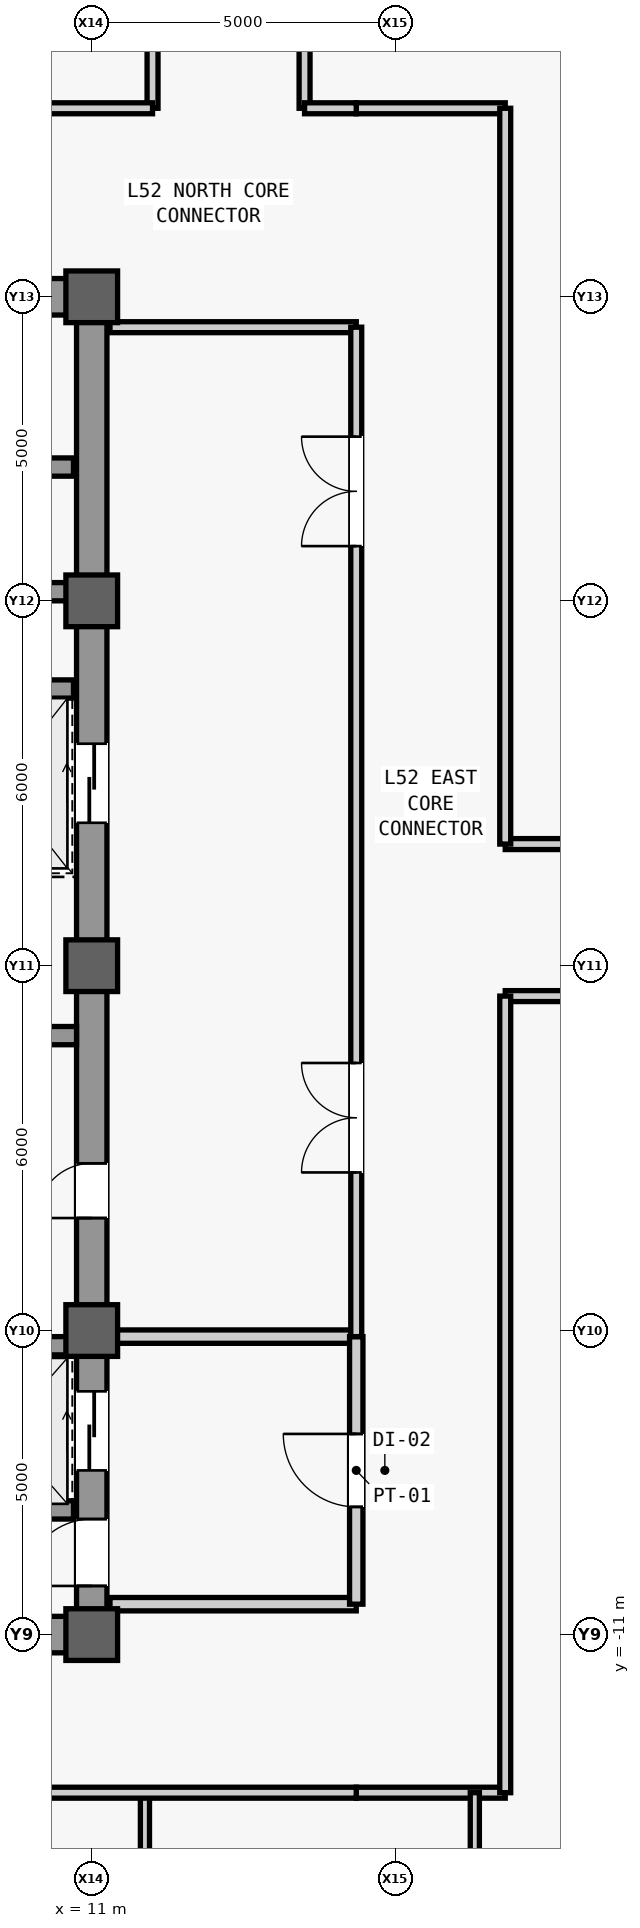
"""IFC4 building model, lengths in metres.
Left out: names, types, materials, properties, quantities, classifications, styles, units other than length and angle.
Written with IfcOpenShell. Run it as: python <this file> out.ifc"""

import sys

from ifc_helpers import new_model, si_unit, direction, frame, frame_2d, origin, origin_2d, place, context, subcontext, project, spatial, rectangle, extrude, source, transform, mapped, element, fill, save


model = new_model("IFC4")
c1 = context("Model", 3, precision=1e-05, world=origin(), true_north=direction((0.0, 1.0)))
c2 = subcontext(c1, "Body", "Model", "MODEL_VIEW")
j1 = project(units=[si_unit("LENGTHUNIT", "METRE"), si_unit("PLANEANGLEUNIT", "RADIAN")], contexts=[c1])
p1 = place(None, origin())
s1 = spatial("IfcSite", under=j1, at=p1, CompositionType="ELEMENT")
p2 = place(p1, origin())
s2 = spatial("IfcBuilding", under=s1, at=p2, CompositionType="ELEMENT")
p3 = place(p2, frame((0.0, 0.0, 223.1)))
s3 = spatial("IfcBuildingStorey", under=s2, at=p3, CompositionType="ELEMENT", Elevation=223.1)
m1 = source(origin(), c2, "Body", "SweptSolid", [
    extrude(rectangle(XDim=22.0, YDim=0.5, at=frame_2d((11.0, 0.0))), origin(), (0.0, 0.0, 1.0), 3.78),
])
p4 = place(p3, frame((11.0, -11.0, 0.0), z_axis=(0.0, 0.0, 1.0), x_axis=(0.0, 1.0, 0.0)))
e1 = element("IfcWall", 1, at=p4, inside=s3, PredefinedType="SHEAR", context=c2, shape_type="MappedRepresentation", body=[
    mapped(m1, transform((0.0, 0.0, 0.0), scale=1.0)),
])
m2 = source(origin(), c2, "Body", "SweptSolid", [
    extrude(rectangle(XDim=1.1, YDim=2.2, at=frame_2d((0.55, 1.1))), frame((0.0, 0.26, 0.0), z_axis=(0.0, -1.0, 0.0), x_axis=(1.0, 0.0, 0.0)), (0.0, 0.0, 1.0), 0.52),
])
p5 = place(p4, frame((0.8, 0.0, 0.0)))
e2 = element("IfcOpeningElement", 2, at=p5, cuts=e1, PredefinedType="OPENING", context=c2, shape_type="MappedRepresentation", body=[
    mapped(m2, transform((0.0, 0.0, 0.0), scale=1.0)),
])
m3 = source(origin(), c2, "Body", "SweptSolid", [
    extrude(rectangle(XDim=0.9, YDim=2.15, at=frame_2d((0.45, 1.075))), frame((0.0, 0.26, 0.0), z_axis=(0.0, -1.0, 0.0), x_axis=(1.0, 0.0, 0.0)), (0.0, 0.0, 1.0), 0.52),
])
p6 = place(p4, frame((6.85, 0.0, 0.0)))
e3 = element("IfcOpeningElement", 3, at=p6, cuts=e1, PredefinedType="OPENING", context=c2, shape_type="MappedRepresentation", body=[
    mapped(m3, transform((0.0, 0.0, 0.0), scale=1.0)),
])
m4 = source(origin(), c2, "Body", "SweptSolid", [
    extrude(rectangle(XDim=1.3, YDim=2.3, at=frame_2d((0.65, 1.15))), frame((0.0, 0.26, 0.0), z_axis=(0.0, -1.0, 0.0), x_axis=(1.0, 0.0, 0.0)), (0.0, 0.0, 1.0), 0.52),
])
p7 = place(p4, frame((2.7, 0.0, 0.0)))
e4 = element("IfcOpeningElement", 4, at=p7, cuts=e1, PredefinedType="OPENING", context=c2, shape_type="MappedRepresentation", body=[
    mapped(m4, transform((0.0, 0.0, 0.0), scale=1.0)),
])
p8 = place(p4, frame((13.35, 0.0, 0.0)))
e5 = element("IfcOpeningElement", 5, at=p8, cuts=e1, PredefinedType="OPENING", context=c2, shape_type="MappedRepresentation", body=[
    mapped(m4, transform((0.0, 0.0, 0.0), scale=1.0)),
])
m5 = source(origin(), c2, "Body", "SweptSolid", [
    extrude(rectangle(XDim=5.9, YDim=0.6, at=frame_2d((2.95, 0.0))), origin(), (0.0, 0.0, 1.0), 3.78),
])
p9 = place(p3, frame((4.85, -11.0, 0.0), z_axis=(0.0, 0.0, 1.0), x_axis=(1.0, 0.0, 0.0)))
e6 = element("IfcWall", 6, at=p9, inside=s3, PredefinedType="SHEAR", context=c2, shape_type="MappedRepresentation", body=[
    mapped(m5, transform((0.0, 0.0, 0.0), scale=1.0)),
])
p10 = place(p3, frame((4.85, 11.0, 0.0), z_axis=(0.0, 0.0, 1.0), x_axis=(1.0, 0.0, 0.0)))
e7 = element("IfcWall", 7, at=p10, inside=s3, PredefinedType="SHEAR", context=c2, shape_type="MappedRepresentation", body=[
    mapped(m5, transform((0.0, 0.0, 0.0), scale=1.0)),
])
m6 = source(origin(), c2, "Body", "SweptSolid", [
    extrude(rectangle(XDim=1.05, YDim=2.2, at=frame_2d((0.525, 1.1))), frame((0.0, 0.31, 0.0), z_axis=(0.0, -1.0, 0.0), x_axis=(1.0, 0.0, 0.0)), (0.0, 0.0, 1.0), 0.62),
])
p11 = place(p10, frame((1.375, 0.0, 0.0)))
e8 = element("IfcOpeningElement", 8, at=p11, cuts=e7, PredefinedType="OPENING", context=c2, shape_type="MappedRepresentation", body=[
    mapped(m6, transform((0.0, 0.0, 0.0), scale=1.0)),
])
m7 = source(origin(), c2, "Body", "SweptSolid", [
    extrude(rectangle(XDim=5.65, YDim=0.3, at=frame_2d((2.825, 0.0))), origin(), (0.0, 0.0, 1.0), 3.78),
])
p12 = place(p3, frame((5.1, -1.15, 0.0), z_axis=(0.0, 0.0, 1.0), x_axis=(1.0, 0.0, 0.0)))
e9 = element("IfcWall", 9, at=p12, inside=s3, PredefinedType="SHEAR", context=c2, shape_type="MappedRepresentation", body=[
    mapped(m7, transform((0.0, 0.0, 0.0), scale=1.0)),
])
m8 = source(origin(), c2, "Body", "SweptSolid", [
    extrude(rectangle(XDim=0.85, YDim=0.85, at=origin_2d()), origin(), (0.0, 0.0, 1.0), 4.0),
])
for number, where, z_axis, x_axis in (
    (10, (11.0, -11.0, 0.0), (0.0, 0.0, 1.0), (1.0, 0.0, 0.0)),
    (11, (11.0, -6.0, 0.0), (0.0, 0.0, 1.0), (1.0, 0.0, 0.0)),
    (12, (11.0, 0.0, 0.0), (0.0, 0.0, 1.0), (1.0, 0.0, 0.0)),
    (13, (11.0, 6.0, 0.0), (0.0, 0.0, 1.0), (1.0, 0.0, 0.0)),
    (14, (11.0, 11.0, 0.0), (0.0, 0.0, 1.0), (1.0, 0.0, 0.0)),
):
    element("IfcColumn", number, at=place(p3, frame(where, z_axis=z_axis, x_axis=x_axis)), inside=s3, PredefinedType="COLUMN", context=c2, shape_type="MappedRepresentation", body=[
        mapped(m8, transform((0.0, 0.0, 0.0), scale=1.0)),
    ])
m9 = source(origin(), c2, "Body", "SweptSolid", [
    extrude(rectangle(XDim=2.2, YDim=0.3, at=frame_2d((1.1, 0.0))), origin(), (0.0, 0.0, 1.0), 3.78),
])
for number, where, z_axis, x_axis in (
    (15, (8.5, -8.95, 0.0), (0.0, 0.0, 1.0), (1.0, 0.0, 0.0)),
    (16, (8.5, -6.25, 0.0), (0.0, 0.0, 1.0), (1.0, 0.0, 0.0)),
):
    element("IfcWall", number, at=place(p3, frame(where, z_axis=z_axis, x_axis=x_axis)), inside=s3, PredefinedType="SHEAR", context=c2, shape_type="MappedRepresentation", body=[
        mapped(m9, transform((0.0, 0.0, 0.0), scale=1.0)),
    ])
m10 = source(origin(), c2, "Body", "SweptSolid", [
    extrude(rectangle(XDim=2.3, YDim=0.3, at=frame_2d((1.15, 0.0))), origin(), (0.0, 0.0, 1.0), 3.78),
])
for number, where, z_axis, x_axis in (
    (17, (8.4, 4.55, 0.0), (0.0, 0.0, 1.0), (1.0, 0.0, 0.0)),
    (18, (8.4, 6.15, 0.0), (0.0, 0.0, 1.0), (1.0, 0.0, 0.0)),
    (19, (8.4, 8.2, 0.0), (0.0, 0.0, 1.0), (1.0, 0.0, 0.0)),
):
    element("IfcWall", number, at=place(p3, frame(where, z_axis=z_axis, x_axis=x_axis)), inside=s3, PredefinedType="SHEAR", context=c2, shape_type="MappedRepresentation", body=[
        mapped(m10, transform((0.0, 0.0, 0.0), scale=1.0)),
    ])
m11 = source(origin(), c2, "Body", "SweptSolid", [
    extrude(rectangle(XDim=4.05, YDim=0.22, at=frame_2d((2.025, 0.0))), origin(), (0.0, 0.0, 1.0), 3.78),
])
p13 = place(p3, frame((11.3, -10.5, 0.0), z_axis=(0.0, 0.0, 1.0), x_axis=(1.0, 0.0, 0.0)))
e20 = element("IfcWall", 20, at=p13, inside=s3, PredefinedType="PARTITIONING", context=c2, shape_type="MappedRepresentation", body=[
    mapped(m11, transform((0.0, 0.0, 0.0), scale=1.0)),
])
m12 = source(origin(), c2, "Body", "SweptSolid", [
    extrude(rectangle(XDim=4.05, YDim=0.22, at=frame_2d((2.025, 0.0))), origin(), (0.0, 0.0, 1.0), 3.085),
])
p14 = place(p3, frame((11.3, -6.1, 0.0), z_axis=(0.0, 0.0, 1.0), x_axis=(1.0, 0.0, 0.0)))
e21 = element("IfcWall", 21, at=p14, inside=s3, PredefinedType="PARTITIONING", context=c2, shape_type="MappedRepresentation", body=[
    mapped(m12, transform((0.0, 0.0, 0.0), scale=1.0)),
])
m13 = source(origin(), c2, "Body", "SweptSolid", [
    extrude(rectangle(XDim=4.4, YDim=0.22, at=frame_2d((2.2, 0.0))), origin(), (0.0, 0.0, 1.0), 3.78),
])
p15 = place(p3, frame((15.35, -10.5, 0.0), z_axis=(0.0, 0.0, 1.0), x_axis=(0.0, 1.0, 0.0)))
e22 = element("IfcWall", 22, at=p15, inside=s3, PredefinedType="PARTITIONING", context=c2, shape_type="MappedRepresentation", body=[
    mapped(m13, transform((0.0, 0.0, 0.0), scale=1.0)),
])
m14 = source(origin(), c2, "Body", "SweptSolid", [
    extrude(rectangle(XDim=1.2, YDim=2.2, at=frame_2d((0.6, 1.1))), frame((0.0, 0.12, 0.0), z_axis=(0.0, -1.0, 0.0), x_axis=(1.0, 0.0, 0.0)), (0.0, 0.0, 1.0), 0.24),
])
p16 = place(p15, frame((1.6, 0.0, 0.0)))
e23 = element("IfcOpeningElement", 23, at=p16, cuts=e22, PredefinedType="OPENING", context=c2, shape_type="MappedRepresentation", body=[
    mapped(m14, transform((0.0, 0.0, 0.0), scale=1.0)),
])
m15 = source(origin(), c2, "Body", "SweptSolid", [
    extrude(rectangle(XDim=4.05, YDim=0.18, at=frame_2d((2.025, 0.0))), origin(), (0.0, 0.0, 1.0), 3.78),
])
p17 = place(p3, frame((11.3, 10.5, 0.0), z_axis=(0.0, 0.0, 1.0), x_axis=(1.0, 0.0, 0.0)))
e24 = element("IfcWall", 24, at=p17, inside=s3, PredefinedType="PARTITIONING", context=c2, shape_type="MappedRepresentation", body=[
    mapped(m15, transform((0.0, 0.0, 0.0), scale=1.0)),
])
m16 = source(origin(), c2, "Body", "SweptSolid", [
    extrude(rectangle(XDim=16.6, YDim=0.18, at=frame_2d((8.3, 0.0))), origin(), (0.0, 0.0, 1.0), 3.78),
])
p18 = place(p3, frame((15.35, -6.1, 0.0), z_axis=(0.0, 0.0, 1.0), x_axis=(0.0, 1.0, 0.0)))
e25 = element("IfcWall", 25, at=p18, inside=s3, PredefinedType="PARTITIONING", context=c2, shape_type="MappedRepresentation", body=[
    mapped(m16, transform((0.0, 0.0, 0.0), scale=1.0)),
])
m17 = source(origin(), c2, "Body", "SweptSolid", [
    extrude(rectangle(XDim=1.8, YDim=2.25, at=frame_2d((0.9, 1.125))), frame((0.0, 0.1, 0.0), z_axis=(0.0, -1.0, 0.0), x_axis=(1.0, 0.0, 0.0)), (0.0, 0.0, 1.0), 0.2),
])
p19 = place(p18, frame((2.7, 0.0, 0.0)))
e26 = element("IfcOpeningElement", 26, at=p19, cuts=e25, PredefinedType="OPENING", context=c2, shape_type="MappedRepresentation", body=[
    mapped(m17, transform((0.0, 0.0, 0.0), scale=1.0)),
])
p20 = place(p18, frame((13.0, 0.0, 0.0)))
e27 = element("IfcOpeningElement", 27, at=p20, cuts=e25, PredefinedType="OPENING", context=c2, shape_type="MappedRepresentation", body=[
    mapped(m17, transform((0.0, 0.0, 0.0), scale=1.0)),
])
m18 = source(origin(), c2, "Body", "SweptSolid", [
    extrude(rectangle(XDim=2.45, YDim=0.18, at=frame_2d((1.225, 0.0))), origin(), (0.0, 0.0, 1.0), 3.78),
])
for number, where, z_axis, x_axis in (
    (28, (15.35, -13.6, 0.0), (0.0, 0.0, 1.0), (1.0, 0.0, 0.0)),
    (29, (15.35, 14.1, 0.0), (0.0, 0.0, 1.0), (1.0, 0.0, 0.0)),
):
    element("IfcWall", number, at=place(p3, frame(where, z_axis=z_axis, x_axis=x_axis)), inside=s3, PredefinedType="PARTITIONING", context=c2, shape_type="MappedRepresentation", body=[
        mapped(m18, transform((0.0, 0.0, 0.0), scale=1.0)),
    ])
m19 = source(origin(), c2, "Body", "SweptSolid", [
    extrude(rectangle(XDim=16.4, YDim=0.15, at=frame_2d((8.2, 0.0))), origin(), (0.0, 0.0, 1.0), 3.78),
])
p21 = place(p3, frame((11.875, -30.0, 0.0), z_axis=(0.0, 0.0, 1.0), x_axis=(0.0, 1.0, 0.0)))
e30 = element("IfcWall", 30, at=p21, inside=s3, PredefinedType="PARTITIONING", context=c2, shape_type="MappedRepresentation", body=[
    mapped(m19, transform((0.0, 0.0, 0.0), scale=1.0)),
])
m20 = source(origin(), c2, "Body", "SweptSolid", [
    extrude(rectangle(XDim=0.95, YDim=2.15, at=frame_2d((0.475, 1.075))), frame((0.0, 0.085, 0.0), z_axis=(0.0, -1.0, 0.0), x_axis=(1.0, 0.0, 0.0)), (0.0, 0.0, 1.0), 0.17),
])
p22 = place(p21, frame((11.825, 0.0, 0.0)))
e31 = element("IfcOpeningElement", 31, at=p22, cuts=e30, PredefinedType="OPENING", context=c2, shape_type="MappedRepresentation", body=[
    mapped(m20, transform((0.0, 0.0, 0.0), scale=1.0)),
])
p23 = place(p3, frame((17.3, -30.0, 0.0), z_axis=(0.0, 0.0, 1.0), x_axis=(0.0, 1.0, 0.0)))
e32 = element("IfcWall", 32, at=p23, inside=s3, PredefinedType="PARTITIONING", context=c2, shape_type="MappedRepresentation", body=[
    mapped(m19, transform((0.0, 0.0, 0.0), scale=1.0)),
])
p24 = place(p23, frame((11.825, 0.0, 0.0)))
e33 = element("IfcOpeningElement", 33, at=p24, cuts=e32, PredefinedType="OPENING", context=c2, shape_type="MappedRepresentation", body=[
    mapped(m20, transform((0.0, 0.0, 0.0), scale=1.0)),
])
m21 = source(origin(), c2, "Body", "SweptSolid", [
    extrude(rectangle(XDim=7.85, YDim=0.18, at=frame_2d((3.925, 0.0))), origin(), (0.0, 0.0, 1.0), 3.78),
])
p25 = place(p3, frame((7.5, -13.6, 0.0), z_axis=(0.0, 0.0, 1.0), x_axis=(1.0, 0.0, 0.0)))
e34 = element("IfcWall", 34, at=p25, inside=s3, PredefinedType="PARTITIONING", context=c2, shape_type="MappedRepresentation", body=[
    mapped(m21, transform((0.0, 0.0, 0.0), scale=1.0)),
])
m22 = source(origin(), c2, "Body", "SweptSolid", [
    extrude(rectangle(XDim=15.9, YDim=0.18, at=frame_2d((7.95, 0.0))), origin(), (0.0, 0.0, 1.0), 3.78),
])
p26 = place(p3, frame((12.0, 14.1, 0.0), z_axis=(0.0, 0.0, 1.0), x_axis=(0.0, 1.0, 0.0)))
e35 = element("IfcWall", 35, at=p26, inside=s3, PredefinedType="PARTITIONING", context=c2, shape_type="MappedRepresentation", body=[
    mapped(m22, transform((0.0, 0.0, 0.0), scale=1.0)),
])
m23 = source(origin(), c2, "Body", "SweptSolid", [
    extrude(rectangle(XDim=1.05, YDim=2.2, at=frame_2d((0.525, 1.1))), frame((0.0, 0.1, 0.0), z_axis=(0.0, -1.0, 0.0), x_axis=(1.0, 0.0, 0.0)), (0.0, 0.0, 1.0), 0.2),
])
p27 = place(p26, frame((11.4, 0.0, 0.0)))
e36 = element("IfcOpeningElement", 36, at=p27, cuts=e35, PredefinedType="OPENING", context=c2, shape_type="MappedRepresentation", body=[
    mapped(m23, transform((0.0, 0.0, 0.0), scale=1.0)),
])
m24 = source(origin(), c2, "Body", "SweptSolid", [
    extrude(rectangle(XDim=27.35, YDim=0.18, at=frame_2d((13.675, 0.0))), origin(), (0.0, 0.0, 1.0), 3.78),
])
p28 = place(p3, frame((-15.35, 14.1, 0.0), z_axis=(0.0, 0.0, 1.0), x_axis=(1.0, 0.0, 0.0)))
e37 = element("IfcWall", 37, at=p28, inside=s3, PredefinedType="PARTITIONING", context=c2, shape_type="MappedRepresentation", body=[
    mapped(m24, transform((0.0, 0.0, 0.0), scale=1.0)),
])
p29 = place(p3, frame((14.5, 14.1, 0.0), z_axis=(0.0, 0.0, 1.0), x_axis=(0.0, 1.0, 0.0)))
e38 = element("IfcWall", 38, at=p29, inside=s3, PredefinedType="PARTITIONING", context=c2, shape_type="MappedRepresentation", body=[
    mapped(m22, transform((0.0, 0.0, 0.0), scale=1.0)),
])
p30 = place(p29, frame((11.4, 0.0, 0.0)))
e39 = element("IfcOpeningElement", 39, at=p30, cuts=e38, PredefinedType="OPENING", context=c2, shape_type="MappedRepresentation", body=[
    mapped(m23, transform((0.0, 0.0, 0.0), scale=1.0)),
])
m25 = source(origin(), c2, "Body", "SweptSolid", [
    extrude(rectangle(XDim=0.85, YDim=0.18, at=frame_2d((0.425, 0.0))), origin(), (0.0, 0.0, 1.0), 3.78),
])
p31 = place(p3, frame((14.5, 14.1, 0.0), z_axis=(0.0, 0.0, 1.0), x_axis=(1.0, 0.0, 0.0)))
e40 = element("IfcWall", 40, at=p31, inside=s3, PredefinedType="PARTITIONING", context=c2, shape_type="MappedRepresentation", body=[
    mapped(m25, transform((0.0, 0.0, 0.0), scale=1.0)),
])
m26 = source(origin(), c2, "Body", "SweptSolid", [
    extrude(rectangle(XDim=12.2, YDim=0.18, at=frame_2d((6.1, 0.0))), origin(), (0.0, 0.0, 1.0), 3.78),
])
p32 = place(p3, frame((17.8, -0.5, 0.0), z_axis=(0.0, 0.0, 1.0), x_axis=(1.0, 0.0, 0.0)))
e41 = element("IfcWall", 41, at=p32, inside=s3, PredefinedType="PARTITIONING", context=c2, shape_type="MappedRepresentation", body=[
    mapped(m26, transform((0.0, 0.0, 0.0), scale=1.0)),
])
m27 = source(origin(), c2, "Body", "SweptSolid", [
    extrude(rectangle(XDim=0.95, YDim=2.15, at=frame_2d((0.475, 1.075))), frame((0.0, 0.1, 0.0), z_axis=(0.0, -1.0, 0.0), x_axis=(1.0, 0.0, 0.0)), (0.0, 0.0, 1.0), 0.2),
])
p33 = place(p32, frame((2.758, 0.0, 0.0)))
e42 = element("IfcOpeningElement", 42, at=p33, cuts=e41, PredefinedType="OPENING", context=c2, shape_type="MappedRepresentation", body=[
    mapped(m27, transform((0.0, 0.0, 0.0), scale=1.0)),
])
p34 = place(p32, frame((8.858, 0.0, 0.0)))
e43 = element("IfcOpeningElement", 43, at=p34, cuts=e41, PredefinedType="OPENING", context=c2, shape_type="MappedRepresentation", body=[
    mapped(m27, transform((0.0, 0.0, 0.0), scale=1.0)),
])
m28 = source(origin(), c2, "Body", "SweptSolid", [
    extrude(rectangle(XDim=13.1, YDim=0.18, at=frame_2d((6.55, 0.0))), origin(), (0.0, 0.0, 1.0), 3.78),
])
p35 = place(p3, frame((17.8, -13.6, 0.0), z_axis=(0.0, 0.0, 1.0), x_axis=(0.0, 1.0, 0.0)))
e44 = element("IfcWall", 44, at=p35, inside=s3, PredefinedType="PARTITIONING", context=c2, shape_type="MappedRepresentation", body=[
    mapped(m28, transform((0.0, 0.0, 0.0), scale=1.0)),
])
p36 = place(p3, frame((17.8, 2.0, 0.0), z_axis=(0.0, 0.0, 1.0), x_axis=(1.0, 0.0, 0.0)))
e45 = element("IfcWall", 45, at=p36, inside=s3, PredefinedType="PARTITIONING", context=c2, shape_type="MappedRepresentation", body=[
    mapped(m26, transform((0.0, 0.0, 0.0), scale=1.0)),
])
p37 = place(p36, frame((2.758, 0.0, 0.0)))
e46 = element("IfcOpeningElement", 46, at=p37, cuts=e45, PredefinedType="OPENING", context=c2, shape_type="MappedRepresentation", body=[
    mapped(m27, transform((0.0, 0.0, 0.0), scale=1.0)),
])
p38 = place(p36, frame((8.858, 0.0, 0.0)))
e47 = element("IfcOpeningElement", 47, at=p38, cuts=e45, PredefinedType="OPENING", context=c2, shape_type="MappedRepresentation", body=[
    mapped(m27, transform((0.0, 0.0, 0.0), scale=1.0)),
])
m29 = source(origin(), c2, "Body", "SweptSolid", [
    extrude(rectangle(XDim=12.1, YDim=0.18, at=frame_2d((6.05, 0.0))), origin(), (0.0, 0.0, 1.0), 3.78),
])
p39 = place(p3, frame((17.8, 2.0, 0.0), z_axis=(0.0, 0.0, 1.0), x_axis=(0.0, 1.0, 0.0)))
e48 = element("IfcWall", 48, at=p39, inside=s3, PredefinedType="PARTITIONING", context=c2, shape_type="MappedRepresentation", body=[
    mapped(m29, transform((0.0, 0.0, 0.0), scale=1.0)),
])
m30 = source(origin(), c2, "Body", "SweptSolid", [
    extrude(rectangle(XDim=1.1, YDim=2.2, at=frame_2d((0.55, 1.1))), frame((0.0, 0.025, 0.0), z_axis=(0.0, -1.0, 0.0), x_axis=(1.0, 0.0, 0.0)), (0.0, 0.0, 1.0), 0.05),
])
p40 = place(p5, origin())
e49 = element("IfcDoor", 49, at=p40, inside=s3, OperationType="SINGLE_SWING_LEFT", PredefinedType="DOOR", context=c2, shape_type="MappedRepresentation", body=[
    mapped(m30, transform((0.0, 0.0, 0.0), scale=1.0)),
])
fill(e2, e49)
m31 = source(origin(), c2, "Body", "SweptSolid", [
    extrude(rectangle(XDim=0.9, YDim=2.15, at=frame_2d((0.45, 1.075))), frame((0.0, 0.025, 0.0), z_axis=(0.0, -1.0, 0.0), x_axis=(1.0, 0.0, 0.0)), (0.0, 0.0, 1.0), 0.05),
])
p41 = place(p6, origin())
e50 = element("IfcDoor", 50, at=p41, inside=s3, OperationType="SINGLE_SWING_LEFT", PredefinedType="DOOR", context=c2, shape_type="MappedRepresentation", body=[
    mapped(m31, transform((0.0, 0.0, 0.0), scale=1.0)),
])
fill(e3, e50)
m32 = source(origin(), c2, "Body", "SweptSolid", [
    extrude(rectangle(XDim=1.2, YDim=2.2, at=frame_2d((0.6, 1.1))), frame((0.0, 0.025, 0.0), z_axis=(0.0, -1.0, 0.0), x_axis=(1.0, 0.0, 0.0)), (0.0, 0.0, 1.0), 0.05),
])
p42 = place(p16, origin())
e51 = element("IfcDoor", 51, at=p42, inside=s3, OperationType="SINGLE_SWING_RIGHT", PredefinedType="DOOR", context=c2, shape_type="MappedRepresentation", body=[
    mapped(m32, transform((0.0, 0.0, 0.0), scale=1.0)),
])
fill(e23, e51)
m33 = source(origin(), c2, "Body", "SweptSolid", [
    extrude(rectangle(XDim=1.8, YDim=2.25, at=frame_2d((0.9, 1.125))), frame((0.0, 0.025, 0.0), z_axis=(0.0, -1.0, 0.0), x_axis=(1.0, 0.0, 0.0)), (0.0, 0.0, 1.0), 0.05),
])
p43 = place(p19, origin())
e52 = element("IfcDoor", 52, at=p43, inside=s3, OperationType="SINGLE_SWING_RIGHT", PredefinedType="DOOR", context=c2, shape_type="MappedRepresentation", body=[
    mapped(m33, transform((0.0, 0.0, 0.0), scale=1.0)),
])
fill(e26, e52)
p44 = place(p20, origin())
e53 = element("IfcDoor", 53, at=p44, inside=s3, OperationType="SINGLE_SWING_LEFT", PredefinedType="DOOR", context=c2, shape_type="MappedRepresentation", body=[
    mapped(m33, transform((0.0, 0.0, 0.0), scale=1.0)),
])
fill(e27, e53)
m34 = source(origin(), c2, "Body", "SweptSolid", [
    extrude(rectangle(XDim=1.3, YDim=2.3, at=frame_2d((0.65, 1.15))), frame((0.0, 0.025, 0.0), z_axis=(0.0, -1.0, 0.0), x_axis=(1.0, 0.0, 0.0)), (0.0, 0.0, 1.0), 0.05),
])
p45 = place(p7, origin())
e54 = element("IfcDoor", 54, at=p45, inside=s3, OperationType="SLIDING_TO_LEFT", PredefinedType="DOOR", context=c2, shape_type="MappedRepresentation", body=[
    mapped(m34, transform((0.0, 0.0, 0.0), scale=1.0)),
])
fill(e4, e54)
p46 = place(p8, origin())
e55 = element("IfcDoor", 55, at=p46, inside=s3, OperationType="SLIDING_TO_LEFT", PredefinedType="DOOR", context=c2, shape_type="MappedRepresentation", body=[
    mapped(m34, transform((0.0, 0.0, 0.0), scale=1.0)),
])
fill(e5, e55)
save(model, sys.argv[1])
